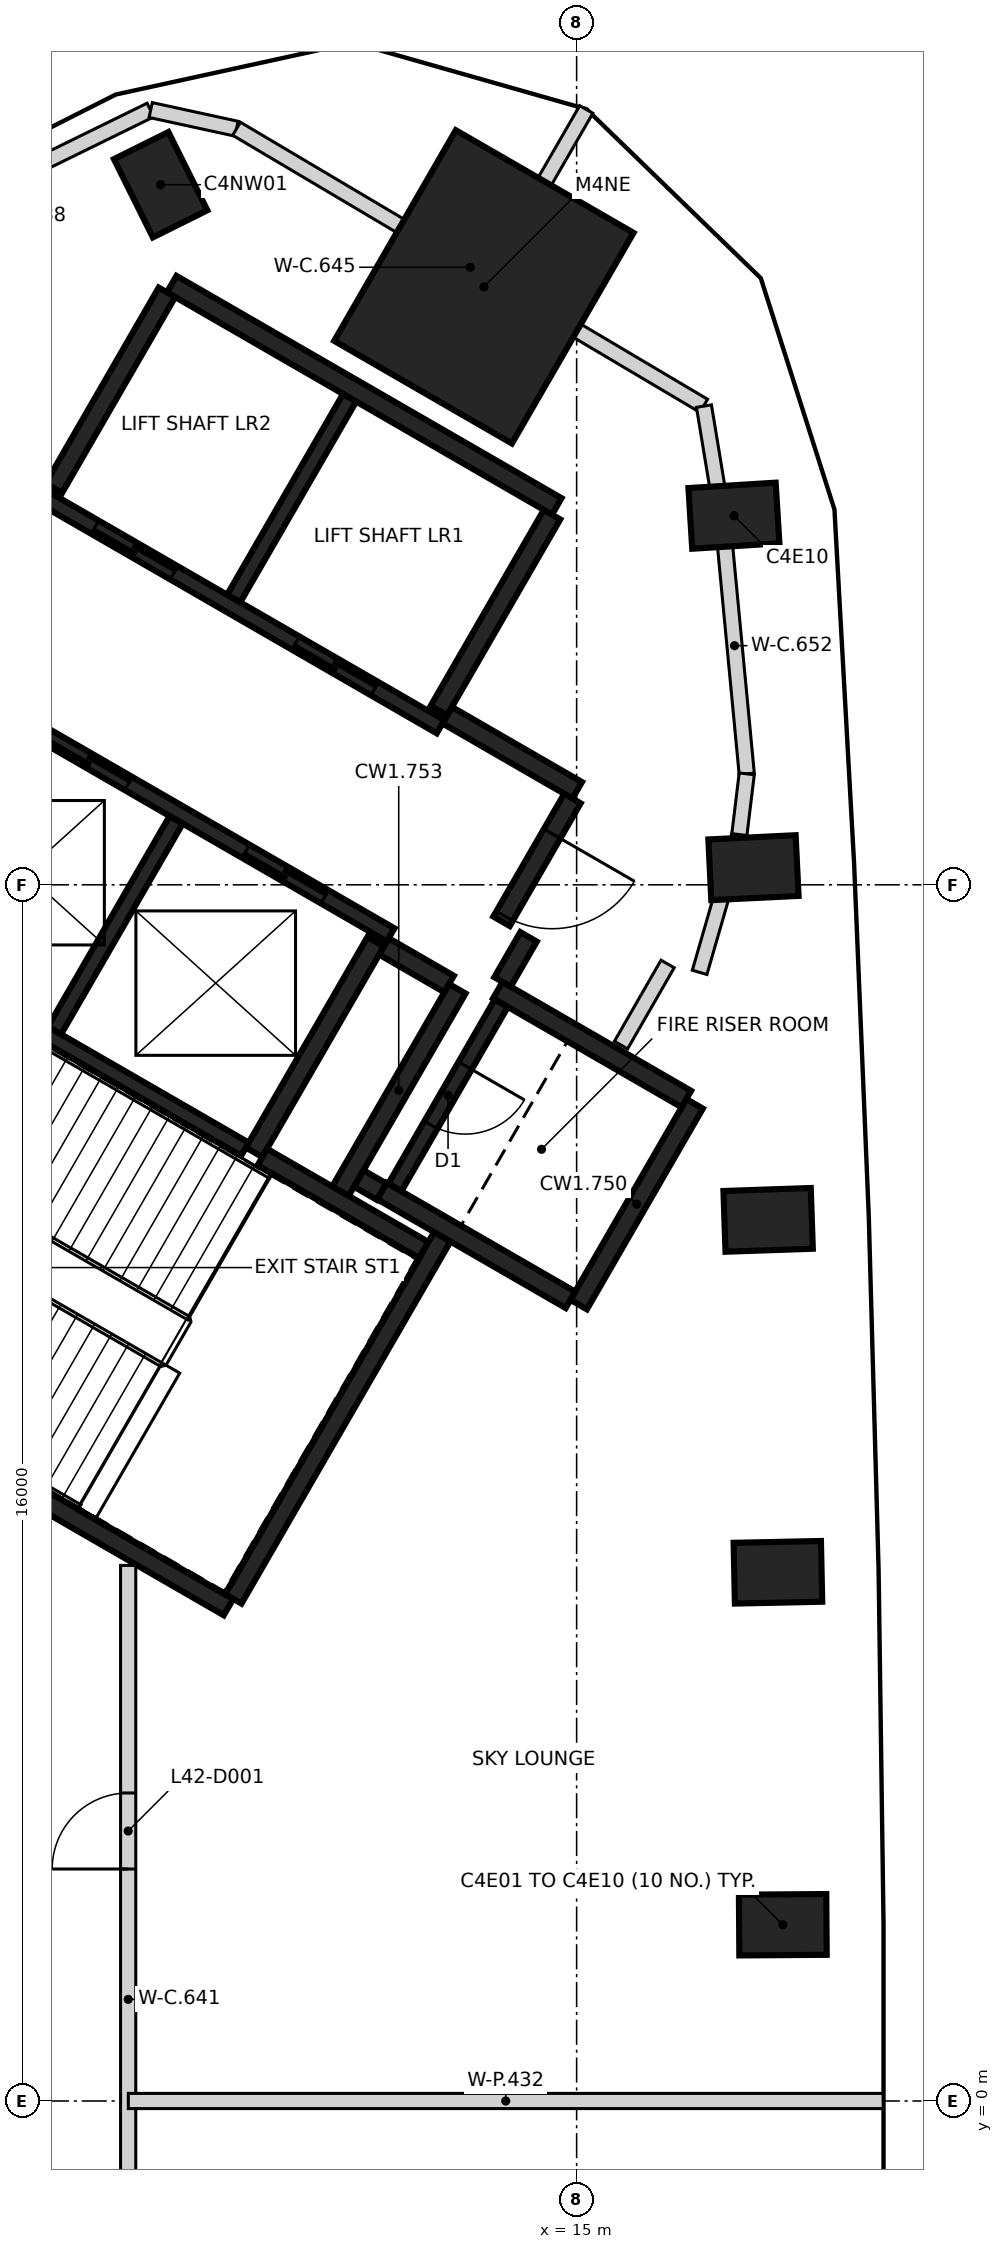
"""IFC4 building model, lengths in metres.
Left out: names, types, materials, properties, quantities, classifications, styles, units other than length and angle.
Written with IfcOpenShell. Run it as: python <this file> out.ifc"""

import sys

from ifc_helpers import new_model, si_unit, direction, frame, frame_2d, origin, origin_2d, place, context, subcontext, project, spatial, rectangle, extrude, element, fill, save


model = new_model("IFC4")
c1 = context("Model", 3, precision=1e-05, world=origin(), true_north=direction((0.0, 1.0)))
c2 = subcontext(c1, "Body", "Model", "MODEL_VIEW")
j1 = project(units=[si_unit("LENGTHUNIT", "METRE"), si_unit("PLANEANGLEUNIT", "RADIAN")], contexts=[c1])
p1 = place(None, origin())
s1 = spatial("IfcSite", under=j1, at=p1, CompositionType="ELEMENT")
p2 = place(p1, origin())
s2 = spatial("IfcBuilding", under=s1, at=p2, CompositionType="ELEMENT")
p3 = place(p2, frame((0.0, 0.0, 169.6)))
s3 = spatial("IfcBuildingStorey", under=s2, at=p3, CompositionType="ELEMENT", Elevation=169.6)
for number, where, z_axis, x_axis in (
    (1, (17.712, 2.319, -0.35), (0.0, 0.0, 1.0), (1.0, 0.007, 0.0)),
    (2, (17.648, 6.956, -0.35), (0.0, 0.0, 1.0), (1.0, 0.021, 0.0)),
    (3, (17.519, 11.592, -0.35), (0.0, 0.0, 1.0), (0.999, 0.034, 0.0)),
    (4, (17.326, 16.226, -0.35), (0.0, 0.0, 1.0), (0.999, 0.048, 0.0)),
    (5, (17.07, 20.856, -0.35), (0.0, 0.0, 1.0), (0.998, 0.062, 0.0)),
    (6, (9.527, 25.211, -0.35), (0.0, 0.0, 1.0), (-0.445, 0.895, 0.0)),
):
    element("IfcColumn", number, at=place(p3, frame(where, z_axis=z_axis, x_axis=x_axis)), inside=s3, PredefinedType="COLUMN", context=c2, shape_type="SweptSolid", body=[
        extrude(rectangle(XDim=1.15, YDim=0.8, at=origin_2d()), origin(), (0.0, 0.0, 1.0), 6.0),
    ])
p4 = place(p3, frame((13.78, 23.867, -0.35), z_axis=(0.0, 0.0, 1.0), x_axis=(0.5, 0.866025403784, 0.0)))
e7 = element("IfcColumn", 7, at=p4, inside=s3, PredefinedType="COLUMN", context=c2, shape_type="SweptSolid", body=[
    extrude(rectangle(XDim=3.2, YDim=2.7, at=origin_2d()), origin(), (0.0, 0.0, 1.0), 6.0),
])
p5 = place(p3, frame((10.42, 6.498, 0.0), z_axis=(0.0, 0.0, 1.0), x_axis=(-0.866021906294, 0.500006057782, 0.0)))
e8 = element("IfcWall", 8, at=p5, inside=s3, PredefinedType="SHEAR", context=c2, shape_type="SweptSolid", body=[
    extrude(rectangle(XDim=11.55, YDim=0.25, at=frame_2d((5.775, 0.0))), origin(), (0.0, 0.0, 1.0), 5.65),
])
p6 = place(p5, frame((10.025, 0.0, 0.0)))
e9 = element("IfcOpeningElement", 9, at=p6, cuts=e8, PredefinedType="OPENING", context=c2, shape_type="SweptSolid", body=[
    extrude(rectangle(XDim=1.2, YDim=2.1, at=frame_2d((0.6, 1.05))), frame((0.0, 0.135, 0.0), z_axis=(0.0, -1.0, 0.0), x_axis=(1.0, 0.0, 0.0)), (0.0, 0.0, 1.0), 0.27),
])
p7 = place(p5, frame((8.725, 0.0, 0.0)))
e10 = element("IfcOpeningElement", 10, at=p7, cuts=e8, PredefinedType="OPENING", context=c2, shape_type="SweptSolid", body=[
    extrude(rectangle(XDim=1.2, YDim=2.1, at=frame_2d((0.6, 1.05))), frame((0.0, 0.135, 0.0), z_axis=(0.0, -1.0, 0.0), x_axis=(1.0, 0.0, 0.0)), (0.0, 0.0, 1.0), 0.27),
])
p8 = place(p3, frame((9.673, 23.903, 0.0), z_axis=(0.0, 0.0, 1.0), x_axis=(0.86603616409, -0.499981362141, 0.0)))
e11 = element("IfcWall", 11, at=p8, inside=s3, PredefinedType="SHEAR", context=c2, shape_type="SweptSolid", body=[
    extrude(rectangle(XDim=5.85, YDim=0.25, at=frame_2d((2.925, 0.0))), origin(), (0.0, 0.0, 1.0), 5.65),
])
p9 = place(p3, frame((13.238, 11.378, 0.0), z_axis=(0.0, 0.0, 1.0), x_axis=(-0.500008851346, -0.866020293397, 0.0)))
e12 = element("IfcWall", 12, at=p9, inside=s3, PredefinedType="SHEAR", context=c2, shape_type="SweptSolid", body=[
    extrude(rectangle(XDim=5.51, YDim=0.25, at=frame_2d((2.755, 0.0))), origin(), (0.0, 0.0, 1.0), 5.65),
])
p10 = place(p3, frame((12.357, 15.252, 0.0), z_axis=(0.0, 0.0, 1.0), x_axis=(-0.500028443584, -0.866008981251, 0.0)))
e13 = element("IfcWall", 13, at=p10, inside=s3, PredefinedType="SHEAR", context=c2, shape_type="SweptSolid", body=[
    extrude(rectangle(XDim=3.2, YDim=0.25, at=frame_2d((1.6, 0.0))), origin(), (0.0, 0.0, 1.0), 5.65),
])
for number, where, z_axis, x_axis in (
    (14, (8.123, 21.219, 0.0), (0.0, 0.0, 1.0), (0.5, 0.866, 0.0)),
    (15, (14.676, 20.87, 0.0), (0.0, 0.0, 1.0), (-0.5, -0.866, 0.0)),
):
    element("IfcWall", number, at=place(p3, frame(where, z_axis=z_axis, x_axis=x_axis)), inside=s3, PredefinedType="SHEAR", context=c2, shape_type="SweptSolid", body=[
        extrude(rectangle(XDim=2.975, YDim=0.25, at=frame_2d((1.487, 0.0))), origin(), (0.0, 0.0, 1.0), 5.65),
    ])
p11 = place(p3, frame((16.552, 13.119, 0.0), z_axis=(0.0, 0.0, 1.0), x_axis=(-0.499978833458, -0.866037623948, 0.0)))
e16 = element("IfcWall", 16, at=p11, inside=s3, PredefinedType="SHEAR", context=c2, shape_type="SweptSolid", body=[
    extrude(rectangle(XDim=3.05, YDim=0.25, at=frame_2d((1.525, 0.0))), origin(), (0.0, 0.0, 1.0), 5.65),
])
p12 = place(p3, frame((14.918, 10.54, 0.0), z_axis=(0.0, 0.0, 1.0), x_axis=(-0.866063538972, 0.499933942099, 0.0)))
e17 = element("IfcWall", 17, at=p12, inside=s3, PredefinedType="SHEAR", context=c2, shape_type="SweptSolid", body=[
    extrude(rectangle(XDim=2.865, YDim=0.25, at=frame_2d((1.432, 0.0))), origin(), (0.0, 0.0, 1.0), 5.65),
])
p13 = place(p3, frame((13.963, 14.614, 0.0), z_axis=(0.0, 0.0, 1.0), x_axis=(0.866042235819, -0.499970844928, 0.0)))
e18 = element("IfcWall", 18, at=p13, inside=s3, PredefinedType="SHEAR", context=c2, shape_type="SweptSolid", body=[
    extrude(rectangle(XDim=2.865, YDim=0.25, at=frame_2d((1.432, 0.0))), origin(), (0.0, 0.0, 1.0), 5.65),
])
p14 = place(p3, frame((11.888, 11.961, 0.0), z_axis=(0.0, 0.0, 1.0), x_axis=(0.500003324108, 0.866023484601, 0.0)))
e19 = element("IfcWall", 19, at=p14, inside=s3, PredefinedType="SHEAR", context=c2, shape_type="SweptSolid", body=[
    extrude(rectangle(XDim=3.085, YDim=0.25, at=frame_2d((1.542, 0.0))), origin(), (0.0, 0.0, 1.0), 5.65),
])
p15 = place(p3, frame((10.865, 12.418, 0.0), z_axis=(0.0, 0.0, 1.0), x_axis=(0.866026229868, -0.499998569178, 0.0)))
e20 = element("IfcWall", 20, at=p15, inside=s3, PredefinedType="SHEAR", context=c2, shape_type="SweptSolid", body=[
    extrude(rectangle(XDim=2.449, YDim=0.25, at=frame_2d((1.225, 0.0))), origin(), (0.0, 0.0, 1.0), 5.65),
])
p16 = place(p3, frame((13.297, 18.231, 0.0), z_axis=(0.0, 0.0, 1.0), x_axis=(0.866043531843, -0.499968599967, 0.0)))
e21 = element("IfcWall", 21, at=p16, inside=s3, PredefinedType="SHEAR", context=c2, shape_type="SweptSolid", body=[
    extrude(rectangle(XDim=1.975, YDim=0.25, at=frame_2d((0.987, 0.0))), origin(), (0.0, 0.0, 1.0), 5.65),
])
p17 = place(p3, frame((14.945, 17.135, 0.0), z_axis=(0.0, 0.0, 1.0), x_axis=(-0.499983108224, -0.866035156036, 0.0)))
e22 = element("IfcWall", 22, at=p17, inside=s3, PredefinedType="SHEAR", context=c2, shape_type="SweptSolid", body=[
    extrude(rectangle(XDim=1.865, YDim=0.25, at=frame_2d((0.932, 0.0))), origin(), (0.0, 0.0, 1.0), 5.65),
])
p18 = place(p17, frame((0.535, 0.0, 0.0)))
e23 = element("IfcOpeningElement", 23, at=p18, cuts=e22, PredefinedType="OPENING", context=c2, shape_type="SweptSolid", body=[
    extrude(rectangle(XDim=1.25, YDim=2.1, at=frame_2d((0.625, 1.05))), frame((0.0, 0.135, 0.0), z_axis=(0.0, -1.0, 0.0), x_axis=(1.0, 0.0, 0.0)), (0.0, 0.0, 1.0), 0.27),
])
p19 = place(p3, frame((13.322, 14.695, 0.0), z_axis=(0.0, 0.0, 1.0), x_axis=(-0.866017078145, 0.500014420154, 0.0)))
e24 = element("IfcWall", 24, at=p19, inside=s3, PredefinedType="SHEAR", context=c2, shape_type="SweptSolid", body=[
    extrude(rectangle(XDim=0.989, YDim=0.25, at=frame_2d((0.495, 0.0))), origin(), (0.0, 0.0, 1.0), 5.65),
])
p20 = place(p3, frame((14.368, 15.315, 0.0), z_axis=(0.0, 0.0, 1.0), x_axis=(-0.499897359611, -0.866084655132, 0.0)))
e25 = element("IfcWall", 25, at=p20, inside=s3, PredefinedType="SHEAR", context=c2, shape_type="SweptSolid", body=[
    extrude(rectangle(XDim=0.685, YDim=0.25, at=frame_2d((0.342, 0.0))), origin(), (0.0, 0.0, 1.0), 5.65),
])
p21 = place(p3, frame((12.433, 11.964, 0.0), z_axis=(0.0, 0.0, 1.0), x_axis=(-0.866055875208, 0.499947218231, 0.0)))
e26 = element("IfcWall", 26, at=p21, inside=s3, PredefinedType="SHEAR", context=c2, shape_type="SweptSolid", body=[
    extrude(rectangle(XDim=0.345, YDim=0.25, at=frame_2d((0.172, 0.0))), origin(), (0.0, 0.0, 1.0), 5.65),
])
p22 = place(p3, frame((13.21, 18.08, 0.0), z_axis=(0.0, 0.0, 1.0), x_axis=(-0.866030299012, 0.499991521122, 0.0)))
e27 = element("IfcWall", 27, at=p22, inside=s3, PredefinedType="SHEAR", context=c2, shape_type="SweptSolid", body=[
    extrude(rectangle(XDim=6.1, YDim=0.2, at=frame_2d((3.05, 0.0))), origin(), (0.0, 0.0, 1.0), 5.65),
])
p23 = place(p22, frame((1.0, 0.0, 0.0)))
e28 = element("IfcOpeningElement", 28, at=p23, cuts=e27, PredefinedType="OPENING", context=c2, shape_type="SweptSolid", body=[
    extrude(rectangle(XDim=1.2, YDim=2.1, at=frame_2d((0.6, 1.05))), frame((0.0, 0.11, 0.0), z_axis=(0.0, -1.0, 0.0), x_axis=(1.0, 0.0, 0.0)), (0.0, 0.0, 1.0), 0.22),
])
p24 = place(p22, frame((4.05, 0.0, 0.0)))
e29 = element("IfcOpeningElement", 29, at=p24, cuts=e27, PredefinedType="OPENING", context=c2, shape_type="SweptSolid", body=[
    extrude(rectangle(XDim=1.2, YDim=2.1, at=frame_2d((0.6, 1.05))), frame((0.0, 0.11, 0.0), z_axis=(0.0, -1.0, 0.0), x_axis=(1.0, 0.0, 0.0)), (0.0, 0.0, 1.0), 0.22),
])
p25 = place(p3, frame((12.552, 15.342, 0.0), z_axis=(0.0, 0.0, 1.0), x_axis=(-0.866030299012, 0.499991521122, 0.0)))
e30 = element("IfcWall", 30, at=p25, inside=s3, PredefinedType="SHEAR", context=c2, shape_type="SweptSolid", body=[
    extrude(rectangle(XDim=6.1, YDim=0.2, at=frame_2d((3.05, 0.0))), origin(), (0.0, 0.0, 1.0), 5.65),
])
p26 = place(p25, frame((1.0, 0.0, 0.0)))
e31 = element("IfcOpeningElement", 31, at=p26, cuts=e30, PredefinedType="OPENING", context=c2, shape_type="SweptSolid", body=[
    extrude(rectangle(XDim=1.2, YDim=2.1, at=frame_2d((0.6, 1.05))), frame((0.0, 0.11, 0.0), z_axis=(0.0, -1.0, 0.0), x_axis=(1.0, 0.0, 0.0)), (0.0, 0.0, 1.0), 0.22),
])
p27 = place(p25, frame((3.982, 0.0, 0.0)))
e32 = element("IfcOpeningElement", 32, at=p27, cuts=e30, PredefinedType="OPENING", context=c2, shape_type="SweptSolid", body=[
    extrude(rectangle(XDim=1.2, YDim=2.1, at=frame_2d((0.6, 1.05))), frame((0.0, 0.11, 0.0), z_axis=(0.0, -1.0, 0.0), x_axis=(1.0, 0.0, 0.0)), (0.0, 0.0, 1.0), 0.22),
])
p28 = place(p3, frame((10.636, 12.521, 0.0), z_axis=(0.0, 0.0, 1.0), x_axis=(-0.866013252188, 0.500021046592, 0.0)))
e33 = element("IfcWall", 33, at=p28, inside=s3, PredefinedType="SHEAR", context=c2, shape_type="SweptSolid", body=[
    extrude(rectangle(XDim=5.851, YDim=0.2, at=frame_2d((2.925, 0.0))), origin(), (0.0, 0.0, 1.0), 5.65),
])
p29 = place(p3, frame((8.132, 14.084, 0.0), z_axis=(0.0, 0.0, 1.0), x_axis=(0.500030834389, 0.86600760081, 0.0)))
e34 = element("IfcWall", 34, at=p29, inside=s3, PredefinedType="SHEAR", context=c2, shape_type="SweptSolid", body=[
    extrude(rectangle(XDim=3.198, YDim=0.2, at=frame_2d((1.599, 0.0))), origin(), (0.0, 0.0, 1.0), 5.65),
])
p30 = place(p3, frame((10.489, 19.767, 0.0), z_axis=(0.0, 0.0, 1.0), x_axis=(0.499946628782, 0.866056215479, 0.0)))
e35 = element("IfcWall", 35, at=p30, inside=s3, PredefinedType="SHEAR", context=c2, shape_type="SweptSolid", body=[
    extrude(rectangle(XDim=3.048, YDim=0.2, at=frame_2d((1.524, 0.0))), origin(), (0.0, 0.0, 1.0), 5.65),
])
p31 = place(p3, frame((14.008, 14.442, 0.0), z_axis=(0.0, 0.0, 1.0), x_axis=(-0.499986818241, -0.866033014143, 0.0)))
e36 = element("IfcWall", 36, at=p31, inside=s3, PredefinedType="SHEAR", context=c2, shape_type="SweptSolid", body=[
    extrude(rectangle(XDim=2.798, YDim=0.2, at=frame_2d((1.399, 0.0))), origin(), (0.0, 0.0, 1.0), 5.65),
])
p32 = place(p31, frame((0.949, 0.0, 0.0)))
e37 = element("IfcOpeningElement", 37, at=p32, cuts=e36, PredefinedType="OPENING", context=c2, shape_type="SweptSolid", body=[
    extrude(rectangle(XDim=0.9, YDim=2.1, at=frame_2d((0.45, 1.05))), frame((0.0, 0.11, 0.0), z_axis=(0.0, -1.0, 0.0), x_axis=(1.0, 0.0, 0.0)), (0.0, 0.0, 1.0), 0.22),
])
p33 = place(p3, frame((4.745, 23.914, 0.0), z_axis=(0.0, 0.0, 1.0), x_axis=(0.897871376736, 0.44025786857, 0.0)))
e38 = element("IfcWall", 38, at=p33, inside=s3, PredefinedType="PARTITIONING", context=c2, shape_type="SweptSolid", body=[
    extrude(rectangle(XDim=5.177, YDim=0.2, at=frame_2d((2.588, 0.0))), origin(), (0.0, 0.0, 1.0), 5.65),
])
p34 = place(p3, frame((9.1, -4.372, 0.0), z_axis=(0.0, 0.0, 1.0), x_axis=(0.0, 1.0, 0.0)))
e39 = element("IfcWall", 39, at=p34, inside=s3, PredefinedType="PARTITIONING", context=c2, shape_type="SweptSolid", body=[
    extrude(rectangle(XDim=11.418, YDim=0.2, at=frame_2d((5.709, 0.0))), origin(), (0.0, 0.0, 1.0), 5.65),
])
p35 = place(p34, frame((7.424, 0.0, 0.0)))
e40 = element("IfcOpeningElement", 40, at=p35, cuts=e39, PredefinedType="OPENING", context=c2, shape_type="SweptSolid", body=[
    extrude(rectangle(XDim=1.0, YDim=2.1, at=frame_2d((0.5, 1.05))), frame((0.0, 0.11, 0.0), z_axis=(0.0, -1.0, 0.0), x_axis=(1.0, 0.0, 0.0)), (0.0, 0.0, 1.0), 0.22),
])
p36 = place(p3, frame((9.396, 26.193, 0.0), z_axis=(0.0, 0.0, 1.0), x_axis=(0.977092447053, -0.212815295296, 0.0)))
e41 = element("IfcWall", 41, at=p36, inside=s3, PredefinedType="PARTITIONING", context=c2, shape_type="SweptSolid", body=[
    extrude(rectangle(XDim=1.156, YDim=0.2, at=frame_2d((0.578, 0.0))), origin(), (0.0, 0.0, 1.0), 5.65),
])
p37 = place(p3, frame((10.526, 25.947, 0.0), z_axis=(0.0, 0.0, 1.0), x_axis=(0.860134432283, -0.510067405742, 0.0)))
e42 = element("IfcWall", 42, at=p37, inside=s3, PredefinedType="PARTITIONING", context=c2, shape_type="SweptSolid", body=[
    extrude(rectangle(XDim=7.146, YDim=0.2, at=frame_2d((3.573, 0.0))), origin(), (0.0, 0.0, 1.0), 4.75),
])
p38 = place(p3, frame((15.584, 13.891, 0.0), z_axis=(0.0, 0.0, 1.0), x_axis=(0.498102255804, 0.867118298021, 0.0)))
e43 = element("IfcWall", 43, at=p38, inside=s3, PredefinedType="PARTITIONING", context=c2, shape_type="SweptSolid", body=[
    extrude(rectangle(XDim=1.231, YDim=0.2, at=frame_2d((0.616, 0.0))), origin(), (0.0, 0.0, 1.0), 5.65),
])
p39 = place(p3, frame((16.618, 14.848, 0.0), z_axis=(0.0, 0.0, 1.0), x_axis=(0.277680505718, 0.960673480817, 0.0)))
e44 = element("IfcWall", 44, at=p39, inside=s3, PredefinedType="PARTITIONING", context=c2, shape_type="SweptSolid", body=[
    extrude(rectangle(XDim=1.884, YDim=0.2, at=frame_2d((0.942, 0.0))), origin(), (0.0, 0.0, 1.0), 5.65),
])
p40 = place(p3, frame((16.675, 22.298, 0.0), z_axis=(0.0, 0.0, 1.0), x_axis=(0.162826774329, -0.98665467189, 0.0)))
e45 = element("IfcWall", 45, at=p40, inside=s3, PredefinedType="PARTITIONING", context=c2, shape_type="SweptSolid", body=[
    extrude(rectangle(XDim=1.486, YDim=0.2, at=frame_2d((0.743, 0.0))), origin(), (0.0, 0.0, 1.0), 5.65),
])
p41 = place(p3, frame((16.917, 20.832, 0.0), z_axis=(0.0, 0.0, 1.0), x_axis=(0.094778481, -0.995498387512, 0.0)))
e46 = element("IfcWall", 46, at=p41, inside=s3, PredefinedType="PARTITIONING", context=c2, shape_type="SweptSolid", body=[
    extrude(rectangle(XDim=3.387, YDim=0.2, at=frame_2d((1.694, 0.0))), origin(), (0.0, 0.0, 1.0), 4.75),
])
p42 = place(p3, frame((17.141, 16.661, 0.0), z_axis=(0.0, 0.0, 1.0), x_axis=(0.120412889455, 0.992723897191, 0.0)))
e47 = element("IfcWall", 47, at=p42, inside=s3, PredefinedType="PARTITIONING", context=c2, shape_type="SweptSolid", body=[
    extrude(rectangle(XDim=0.805, YDim=0.2, at=frame_2d((0.402, 0.0))), origin(), (0.0, 0.0, 1.0), 4.75),
])
p43 = place(p3, frame((9.102, 0.0, 0.0), z_axis=(0.0, 0.0, 1.0), x_axis=(1.0, 0.0, 0.0)))
e48 = element("IfcWall", 48, at=p43, inside=s3, PredefinedType="PARTITIONING", context=c2, shape_type="SweptSolid", body=[
    extrude(rectangle(XDim=9.93, YDim=0.2, at=frame_2d((4.965, 0.0))), origin(), (0.0, 0.0, 1.0), 4.75),
])
p44 = place(p3, frame((13.845, 23.98, 0.0), z_axis=(0.0, 0.0, 1.0), x_axis=(0.499958721521, 0.866049234614, 0.0)))
e49 = element("IfcWall", 49, at=p44, inside=s3, PredefinedType="PARTITIONING", context=c2, shape_type="SweptSolid", body=[
    extrude(rectangle(XDim=2.564, YDim=0.2, at=frame_2d((1.282, 0.0))), origin(), (0.0, 0.0, 1.0), 5.65),
])
p45 = place(p26, origin())
e50 = element("IfcDoor", 50, at=p45, inside=s3, OperationType="DOUBLE_DOOR_SLIDING", PredefinedType="DOOR", context=c2, shape_type="SweptSolid", body=[
    extrude(rectangle(XDim=1.2, YDim=2.1, at=frame_2d((0.6, 1.05))), frame((0.0, 0.025, 0.0), z_axis=(0.0, -1.0, 0.0), x_axis=(1.0, 0.0, 0.0)), (0.0, 0.0, 1.0), 0.05),
])
fill(e31, e50)
p46 = place(p27, origin())
e51 = element("IfcDoor", 51, at=p46, inside=s3, OperationType="DOUBLE_DOOR_SLIDING", PredefinedType="DOOR", context=c2, shape_type="SweptSolid", body=[
    extrude(rectangle(XDim=1.2, YDim=2.1, at=frame_2d((0.6, 1.05))), frame((0.0, 0.025, 0.0), z_axis=(0.0, -1.0, 0.0), x_axis=(1.0, 0.0, 0.0)), (0.0, 0.0, 1.0), 0.05),
])
fill(e32, e51)
p47 = place(p23, origin())
e52 = element("IfcDoor", 52, at=p47, inside=s3, OperationType="DOUBLE_DOOR_SLIDING", PredefinedType="DOOR", context=c2, shape_type="SweptSolid", body=[
    extrude(rectangle(XDim=1.2, YDim=2.1, at=frame_2d((0.6, 1.05))), frame((0.0, 0.025, 0.0), z_axis=(0.0, -1.0, 0.0), x_axis=(1.0, 0.0, 0.0)), (0.0, 0.0, 1.0), 0.05),
])
fill(e28, e52)
p48 = place(p24, origin())
e53 = element("IfcDoor", 53, at=p48, inside=s3, OperationType="DOUBLE_DOOR_SLIDING", PredefinedType="DOOR", context=c2, shape_type="SweptSolid", body=[
    extrude(rectangle(XDim=1.2, YDim=2.1, at=frame_2d((0.6, 1.05))), frame((0.0, 0.025, 0.0), z_axis=(0.0, -1.0, 0.0), x_axis=(1.0, 0.0, 0.0)), (0.0, 0.0, 1.0), 0.05),
])
fill(e29, e53)
p49 = place(p18, origin())
e54 = element("IfcDoor", 54, at=p49, inside=s3, OperationType="SINGLE_SWING_LEFT", PredefinedType="DOOR", context=c2, shape_type="SweptSolid", body=[
    extrude(rectangle(XDim=1.25, YDim=2.1, at=frame_2d((0.625, 1.05))), frame((0.0, 0.025, 0.0), z_axis=(0.0, -1.0, 0.0), x_axis=(1.0, 0.0, 0.0)), (0.0, 0.0, 1.0), 0.05),
])
fill(e23, e54)
p50 = place(p32, origin())
e55 = element("IfcDoor", 55, at=p50, inside=s3, OperationType="SINGLE_SWING_RIGHT", PredefinedType="DOOR", context=c2, shape_type="SweptSolid", body=[
    extrude(rectangle(XDim=0.9, YDim=2.1, at=frame_2d((0.45, 1.05))), frame((0.0, 0.025, 0.0), z_axis=(0.0, -1.0, 0.0), x_axis=(1.0, 0.0, 0.0)), (0.0, 0.0, 1.0), 0.05),
])
fill(e37, e55)
p51 = place(p35, frame((1.0, 0.0, 0.0), z_axis=(0.0, 0.0, 1.0), x_axis=(-1.0, 0.0, 0.0)))
e56 = element("IfcDoor", 56, at=p51, inside=s3, OperationType="SINGLE_SWING_LEFT", PredefinedType="DOOR", context=c2, shape_type="SweptSolid", body=[
    extrude(rectangle(XDim=1.0, YDim=2.1, at=frame_2d((0.5, 1.05))), frame((0.0, 0.025, 0.0), z_axis=(0.0, -1.0, 0.0), x_axis=(1.0, 0.0, 0.0)), (0.0, 0.0, 1.0), 0.05),
])
fill(e40, e56)
save(model, sys.argv[1])
